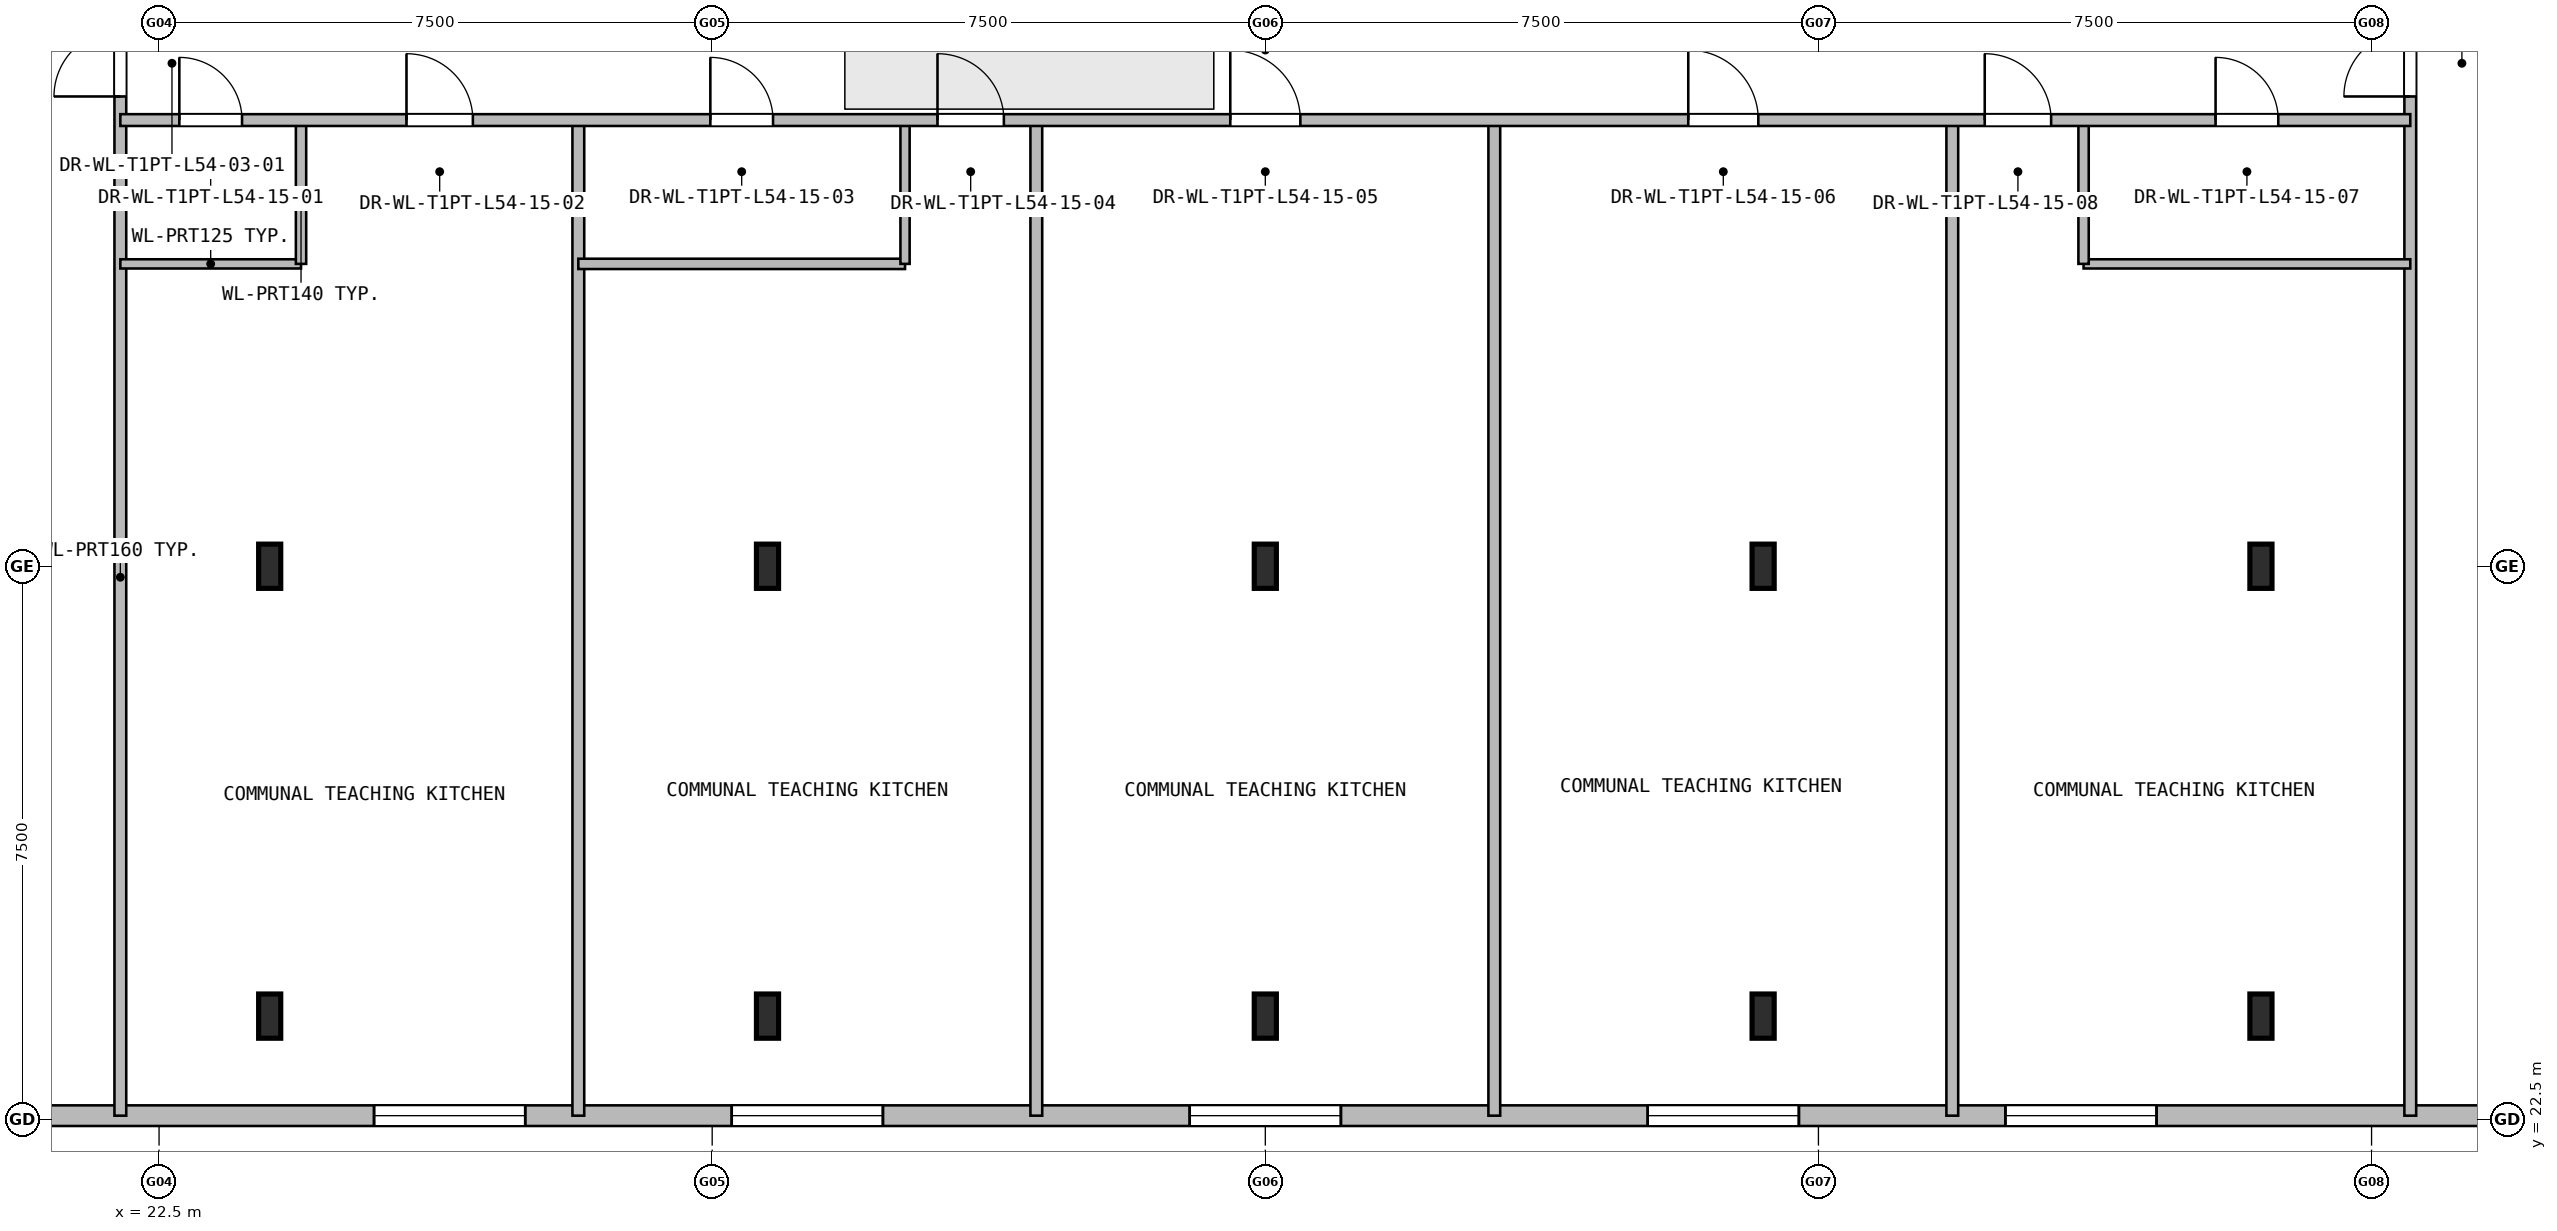
"""IFC4 building model, lengths in metres.
Left out: names, types, materials, properties, quantities, classifications, styles, units other than length and angle.
Written with IfcOpenShell. Run it as: python <this file> out.ifc"""

import sys

from ifc_helpers import new_model, si_unit, direction, frame, frame_2d, origin, origin_2d, place, context, subcontext, project, spatial, rectangle, i_section, extrude, element, fill, save


model = new_model("IFC4")
c1 = context("Model", 3, precision=1e-05, world=origin(), true_north=direction((0.0, 1.0)))
c2 = subcontext(c1, "Body", "Model", "MODEL_VIEW")
j1 = project(units=[si_unit("LENGTHUNIT", "METRE"), si_unit("PLANEANGLEUNIT", "RADIAN")], contexts=[c1])
p1 = place(None, origin())
s1 = spatial("IfcSite", under=j1, at=p1, CompositionType="ELEMENT")
p2 = place(p1, origin())
s2 = spatial("IfcBuilding", under=s1, at=p2, CompositionType="ELEMENT")
p3 = place(p2, frame((0.0, 0.0, 197.1)))
s3 = spatial("IfcBuildingStorey", under=s2, at=p3, CompositionType="ELEMENT", Elevation=197.1)
for number, where, z_axis, x_axis in (
    (1, (24.0, 23.9, 0.0), (0.0, 0.0, 1.0), (1.0, 0.0, 0.0)),
    (2, (24.0, 30.0, 0.0), (0.0, 0.0, 1.0), (1.0, 0.0, 0.0)),
    (3, (30.75, 23.9, 0.0), (0.0, 0.0, 1.0), (1.0, 0.0, 0.0)),
    (4, (30.75, 30.0, 0.0), (0.0, 0.0, 1.0), (1.0, 0.0, 0.0)),
    (5, (37.5, 23.9, 0.0), (0.0, 0.0, 1.0), (1.0, 0.0, 0.0)),
    (6, (37.5, 30.0, 0.0), (0.0, 0.0, 1.0), (1.0, 0.0, 0.0)),
    (7, (44.25, 23.9, 0.0), (0.0, 0.0, 1.0), (1.0, 0.0, 0.0)),
    (8, (44.25, 30.0, 0.0), (0.0, 0.0, 1.0), (1.0, 0.0, 0.0)),
    (9, (51.0, 23.9, 0.0), (0.0, 0.0, 1.0), (1.0, 0.0, 0.0)),
    (10, (51.0, 30.0, 0.0), (0.0, 0.0, 1.0), (1.0, 0.0, 0.0)),
):
    element("IfcColumn", number, at=place(p3, frame(where, z_axis=z_axis, x_axis=x_axis)), inside=s3, PredefinedType="COLUMN", context=c2, shape_type="SweptSolid", body=[
        extrude(i_section(OverallWidth=0.3, OverallDepth=0.6, WebThickness=0.014, FlangeThickness=0.025, at=origin_2d()), origin(), (0.0, 0.0, 1.0), 4.2),
    ])
p4 = place(p3, frame((55.375, 22.55, 0.0), z_axis=(0.0, 0.0, 1.0), x_axis=(-1.0, 0.0, 0.0)))
e11 = element("IfcWall", 11, at=p4, inside=s3, PredefinedType="SOLIDWALL", context=c2, shape_type="SweptSolid", body=[
    extrude(rectangle(XDim=35.75, YDim=0.28, at=frame_2d((17.875, 0.0))), origin(), (0.0, 0.0, 1.0), 3.88),
])
p5 = place(p4, frame((27.91, 0.0, 0.8)))
e12 = element("IfcOpeningElement", 12, at=p5, cuts=e11, PredefinedType="OPENING", context=c2, shape_type="SweptSolid", body=[
    extrude(rectangle(XDim=2.05, YDim=1.9, at=frame_2d((1.025, 0.95))), frame((0.0, 0.15, 0.0), z_axis=(0.0, -1.0, 0.0), x_axis=(1.0, 0.0, 0.0)), (0.0, 0.0, 1.0), 0.3),
])
p6 = place(p4, frame((23.06, 0.0, 0.8)))
e13 = element("IfcOpeningElement", 13, at=p6, cuts=e11, PredefinedType="OPENING", context=c2, shape_type="SweptSolid", body=[
    extrude(rectangle(XDim=2.05, YDim=1.9, at=frame_2d((1.025, 0.95))), frame((0.0, 0.15, 0.0), z_axis=(0.0, -1.0, 0.0), x_axis=(1.0, 0.0, 0.0)), (0.0, 0.0, 1.0), 0.3),
])
p7 = place(p4, frame((16.85, 0.0, 0.8)))
e14 = element("IfcOpeningElement", 14, at=p7, cuts=e11, PredefinedType="OPENING", context=c2, shape_type="SweptSolid", body=[
    extrude(rectangle(XDim=2.05, YDim=1.9, at=frame_2d((1.025, 0.95))), frame((0.0, 0.15, 0.0), z_axis=(0.0, -1.0, 0.0), x_axis=(1.0, 0.0, 0.0)), (0.0, 0.0, 1.0), 0.3),
])
p8 = place(p4, frame((10.64, 0.0, 0.8)))
e15 = element("IfcOpeningElement", 15, at=p8, cuts=e11, PredefinedType="OPENING", context=c2, shape_type="SweptSolid", body=[
    extrude(rectangle(XDim=2.05, YDim=1.9, at=frame_2d((1.025, 0.95))), frame((0.0, 0.15, 0.0), z_axis=(0.0, -1.0, 0.0), x_axis=(1.0, 0.0, 0.0)), (0.0, 0.0, 1.0), 0.3),
])
p9 = place(p4, frame((5.79, 0.0, 0.8)))
e16 = element("IfcOpeningElement", 16, at=p9, cuts=e11, PredefinedType="OPENING", context=c2, shape_type="SweptSolid", body=[
    extrude(rectangle(XDim=2.05, YDim=1.9, at=frame_2d((1.025, 0.95))), frame((0.0, 0.15, 0.0), z_axis=(0.0, -1.0, 0.0), x_axis=(1.0, 0.0, 0.0)), (0.0, 0.0, 1.0), 0.3),
])
p10 = place(p3, frame((21.975, 22.55, 0.0), z_axis=(0.0, 0.0, 1.0), x_axis=(0.0, 1.0, 0.0)))
e17 = element("IfcWall", 17, at=p10, inside=s3, PredefinedType="PARTITIONING", context=c2, shape_type="SweptSolid", body=[
    extrude(rectangle(XDim=15.65, YDim=0.16, at=frame_2d((7.825, 0.0))), origin(), (0.0, 0.0, 1.0), 3.88),
])
p11 = place(p10, frame((13.82, 0.0, 0.0)))
e18 = element("IfcOpeningElement", 18, at=p11, cuts=e17, PredefinedType="OPENING", context=c2, shape_type="SweptSolid", body=[
    extrude(rectangle(XDim=0.9, YDim=2.05, at=frame_2d((0.45, 1.025))), frame((0.0, 0.09, 0.0), z_axis=(0.0, -1.0, 0.0), x_axis=(1.0, 0.0, 0.0)), (0.0, 0.0, 1.0), 0.18),
])
p12 = place(p3, frame((53.025, 22.55, 0.0), z_axis=(0.0, 0.0, 1.0), x_axis=(0.0, 1.0, 0.0)))
e19 = element("IfcWall", 19, at=p12, inside=s3, PredefinedType="PARTITIONING", context=c2, shape_type="SweptSolid", body=[
    extrude(rectangle(XDim=15.65, YDim=0.16, at=frame_2d((7.825, 0.0))), origin(), (0.0, 0.0, 1.0), 3.88),
])
p13 = place(p12, frame((13.82, 0.0, 0.0)))
e20 = element("IfcOpeningElement", 20, at=p13, cuts=e19, PredefinedType="OPENING", context=c2, shape_type="SweptSolid", body=[
    extrude(rectangle(XDim=0.9, YDim=2.05, at=frame_2d((0.45, 1.025))), frame((0.0, 0.09, 0.0), z_axis=(0.0, -1.0, 0.0), x_axis=(1.0, 0.0, 0.0)), (0.0, 0.0, 1.0), 0.18),
])
p14 = place(p3, frame((21.975, 34.1, 0.0), z_axis=(0.0, 0.0, 1.0), x_axis=(1.0, 0.0, 0.0)))
e21 = element("IfcWall", 21, at=p14, inside=s3, PredefinedType="PARTITIONING", context=c2, shape_type="SweptSolid", body=[
    extrude(rectangle(XDim=2.45, YDim=0.125, at=frame_2d((1.225, 0.0))), origin(), (0.0, 0.0, 1.0), 3.53),
])
p15 = place(p3, frame((24.425, 34.1, 0.0), z_axis=(0.0, 0.0, 1.0), x_axis=(0.0, 1.0, 0.0)))
e22 = element("IfcWall", 22, at=p15, inside=s3, PredefinedType="PARTITIONING", context=c2, shape_type="SweptSolid", body=[
    extrude(rectangle(XDim=1.95, YDim=0.14, at=frame_2d((0.975, 0.0))), origin(), (0.0, 0.0, 1.0), 3.88),
])
p16 = place(p3, frame((28.185, 22.55, 0.0), z_axis=(0.0, 0.0, 1.0), x_axis=(0.0, 1.0, 0.0)))
e23 = element("IfcWall", 23, at=p16, inside=s3, PredefinedType="PARTITIONING", context=c2, shape_type="SweptSolid", body=[
    extrude(rectangle(XDim=13.5, YDim=0.16, at=frame_2d((6.75, 0.0))), origin(), (0.0, 0.0, 1.0), 3.88),
])
p17 = place(p3, frame((28.185, 34.1, 0.0), z_axis=(0.0, 0.0, 1.0), x_axis=(1.0, 0.0, 0.0)))
e24 = element("IfcWall", 24, at=p17, inside=s3, PredefinedType="PARTITIONING", context=c2, shape_type="SweptSolid", body=[
    extrude(rectangle(XDim=4.43, YDim=0.14, at=frame_2d((2.215, 0.0))), origin(), (0.0, 0.0, 1.0), 3.53),
])
p18 = place(p3, frame((32.615, 34.1, 0.0), z_axis=(0.0, 0.0, 1.0), x_axis=(0.0, 1.0, 0.0)))
e25 = element("IfcWall", 25, at=p18, inside=s3, PredefinedType="PARTITIONING", context=c2, shape_type="SweptSolid", body=[
    extrude(rectangle(XDim=1.95, YDim=0.125, at=frame_2d((0.975, 0.0))), origin(), (0.0, 0.0, 1.0), 3.88),
])
for number, where, z_axis, x_axis in (
    (26, (34.395, 22.55, 0.0), (0.0, 0.0, 1.0), (0.0, 1.0, 0.0)),
    (27, (40.605, 22.55, 0.0), (0.0, 0.0, 1.0), (0.0, 1.0, 0.0)),
    (28, (46.815, 22.55, 0.0), (0.0, 0.0, 1.0), (0.0, 1.0, 0.0)),
):
    element("IfcWall", number, at=place(p3, frame(where, z_axis=z_axis, x_axis=x_axis)), inside=s3, PredefinedType="PARTITIONING", context=c2, shape_type="SweptSolid", body=[
        extrude(rectangle(XDim=13.5, YDim=0.16, at=frame_2d((6.75, 0.0))), origin(), (0.0, 0.0, 1.0), 3.88),
    ])
p19 = place(p3, frame((48.595, 34.1, 0.0), z_axis=(0.0, 0.0, 1.0), x_axis=(1.0, 0.0, 0.0)))
e29 = element("IfcWall", 29, at=p19, inside=s3, PredefinedType="PARTITIONING", context=c2, shape_type="SweptSolid", body=[
    extrude(rectangle(XDim=4.43, YDim=0.125, at=frame_2d((2.215, 0.0))), origin(), (0.0, 0.0, 1.0), 3.53),
])
p20 = place(p3, frame((48.595, 34.1, 0.0), z_axis=(0.0, 0.0, 1.0), x_axis=(0.0, 1.0, 0.0)))
e30 = element("IfcWall", 30, at=p20, inside=s3, PredefinedType="PARTITIONING", context=c2, shape_type="SweptSolid", body=[
    extrude(rectangle(XDim=1.95, YDim=0.14, at=frame_2d((0.975, 0.0))), origin(), (0.0, 0.0, 1.0), 3.88),
])
p21 = place(p3, frame((21.975, 36.05, 0.0), z_axis=(0.0, 0.0, 1.0), x_axis=(1.0, 0.0, 0.0)))
e31 = element("IfcWall", 31, at=p21, inside=s3, PredefinedType="PARTITIONING", context=c2, shape_type="SweptSolid", body=[
    extrude(rectangle(XDim=31.05, YDim=0.16, at=frame_2d((15.525, 0.0))), origin(), (0.0, 0.0, 1.0), 3.88),
])
p22 = place(p21, frame((0.8, 0.0, 0.0)))
e32 = element("IfcOpeningElement", 32, at=p22, cuts=e31, PredefinedType="OPENING", context=c2, shape_type="SweptSolid", body=[
    extrude(rectangle(XDim=0.85, YDim=2.05, at=frame_2d((0.425, 1.025))), frame((0.0, 0.09, 0.0), z_axis=(0.0, -1.0, 0.0), x_axis=(1.0, 0.0, 0.0)), (0.0, 0.0, 1.0), 0.18),
])
p23 = place(p21, frame((3.88, 0.0, 0.0)))
e33 = element("IfcOpeningElement", 33, at=p23, cuts=e31, PredefinedType="OPENING", context=c2, shape_type="SweptSolid", body=[
    extrude(rectangle(XDim=0.9, YDim=2.05, at=frame_2d((0.45, 1.025))), frame((0.0, 0.09, 0.0), z_axis=(0.0, -1.0, 0.0), x_axis=(1.0, 0.0, 0.0)), (0.0, 0.0, 1.0), 0.18),
])
p24 = place(p21, frame((8.0, 0.0, 0.0)))
e34 = element("IfcOpeningElement", 34, at=p24, cuts=e31, PredefinedType="OPENING", context=c2, shape_type="SweptSolid", body=[
    extrude(rectangle(XDim=0.85, YDim=2.05, at=frame_2d((0.425, 1.025))), frame((0.0, 0.09, 0.0), z_axis=(0.0, -1.0, 0.0), x_axis=(1.0, 0.0, 0.0)), (0.0, 0.0, 1.0), 0.18),
])
p25 = place(p21, frame((11.08, 0.0, 0.0)))
e35 = element("IfcOpeningElement", 35, at=p25, cuts=e31, PredefinedType="OPENING", context=c2, shape_type="SweptSolid", body=[
    extrude(rectangle(XDim=0.9, YDim=2.05, at=frame_2d((0.45, 1.025))), frame((0.0, 0.09, 0.0), z_axis=(0.0, -1.0, 0.0), x_axis=(1.0, 0.0, 0.0)), (0.0, 0.0, 1.0), 0.18),
])
p26 = place(p21, frame((15.05, 0.0, 0.0)))
e36 = element("IfcOpeningElement", 36, at=p26, cuts=e31, PredefinedType="OPENING", context=c2, shape_type="SweptSolid", body=[
    extrude(rectangle(XDim=0.95, YDim=2.1, at=frame_2d((0.475, 1.05))), frame((0.0, 0.09, 0.0), z_axis=(0.0, -1.0, 0.0), x_axis=(1.0, 0.0, 0.0)), (0.0, 0.0, 1.0), 0.18),
])
p27 = place(p21, frame((21.26, 0.0, 0.0)))
e37 = element("IfcOpeningElement", 37, at=p27, cuts=e31, PredefinedType="OPENING", context=c2, shape_type="SweptSolid", body=[
    extrude(rectangle(XDim=0.95, YDim=2.1, at=frame_2d((0.475, 1.05))), frame((0.0, 0.09, 0.0), z_axis=(0.0, -1.0, 0.0), x_axis=(1.0, 0.0, 0.0)), (0.0, 0.0, 1.0), 0.18),
])
p28 = place(p21, frame((28.41, 0.0, 0.0)))
e38 = element("IfcOpeningElement", 38, at=p28, cuts=e31, PredefinedType="OPENING", context=c2, shape_type="SweptSolid", body=[
    extrude(rectangle(XDim=0.85, YDim=2.05, at=frame_2d((0.425, 1.025))), frame((0.0, 0.09, 0.0), z_axis=(0.0, -1.0, 0.0), x_axis=(1.0, 0.0, 0.0)), (0.0, 0.0, 1.0), 0.18),
])
p29 = place(p21, frame((25.28, 0.0, 0.0)))
e39 = element("IfcOpeningElement", 39, at=p29, cuts=e31, PredefinedType="OPENING", context=c2, shape_type="SweptSolid", body=[
    extrude(rectangle(XDim=0.9, YDim=2.05, at=frame_2d((0.45, 1.025))), frame((0.0, 0.09, 0.0), z_axis=(0.0, -1.0, 0.0), x_axis=(1.0, 0.0, 0.0)), (0.0, 0.0, 1.0), 0.18),
])
p30 = place(p5, origin())
e40 = element("IfcWindow", 40, at=p30, inside=s3, PartitioningType="SINGLE_PANEL", PredefinedType="WINDOW", context=c2, shape_type="SweptSolid", body=[
    extrude(rectangle(XDim=2.05, YDim=1.9, at=frame_2d((1.025, 0.95))), frame((0.0, 0.03, 0.0), z_axis=(0.0, -1.0, 0.0), x_axis=(1.0, 0.0, 0.0)), (0.0, 0.0, 1.0), 0.06),
])
fill(e12, e40)
p31 = place(p6, origin())
e41 = element("IfcWindow", 41, at=p31, inside=s3, PartitioningType="SINGLE_PANEL", PredefinedType="WINDOW", context=c2, shape_type="SweptSolid", body=[
    extrude(rectangle(XDim=2.05, YDim=1.9, at=frame_2d((1.025, 0.95))), frame((0.0, 0.03, 0.0), z_axis=(0.0, -1.0, 0.0), x_axis=(1.0, 0.0, 0.0)), (0.0, 0.0, 1.0), 0.06),
])
fill(e13, e41)
p32 = place(p7, origin())
e42 = element("IfcWindow", 42, at=p32, inside=s3, PartitioningType="SINGLE_PANEL", PredefinedType="WINDOW", context=c2, shape_type="SweptSolid", body=[
    extrude(rectangle(XDim=2.05, YDim=1.9, at=frame_2d((1.025, 0.95))), frame((0.0, 0.03, 0.0), z_axis=(0.0, -1.0, 0.0), x_axis=(1.0, 0.0, 0.0)), (0.0, 0.0, 1.0), 0.06),
])
fill(e14, e42)
p33 = place(p8, origin())
e43 = element("IfcWindow", 43, at=p33, inside=s3, PartitioningType="SINGLE_PANEL", PredefinedType="WINDOW", context=c2, shape_type="SweptSolid", body=[
    extrude(rectangle(XDim=2.05, YDim=1.9, at=frame_2d((1.025, 0.95))), frame((0.0, 0.03, 0.0), z_axis=(0.0, -1.0, 0.0), x_axis=(1.0, 0.0, 0.0)), (0.0, 0.0, 1.0), 0.06),
])
fill(e15, e43)
p34 = place(p9, origin())
e44 = element("IfcWindow", 44, at=p34, inside=s3, PartitioningType="SINGLE_PANEL", PredefinedType="WINDOW", context=c2, shape_type="SweptSolid", body=[
    extrude(rectangle(XDim=2.05, YDim=1.9, at=frame_2d((1.025, 0.95))), frame((0.0, 0.03, 0.0), z_axis=(0.0, -1.0, 0.0), x_axis=(1.0, 0.0, 0.0)), (0.0, 0.0, 1.0), 0.06),
])
fill(e16, e44)
p35 = place(p11, origin())
e45 = element("IfcDoor", 45, at=p35, inside=s3, OperationType="SINGLE_SWING_LEFT", PredefinedType="DOOR", context=c2, shape_type="SweptSolid", body=[
    extrude(rectangle(XDim=0.9, YDim=2.05, at=frame_2d((0.45, 1.025))), frame((0.0, 0.025, 0.0), z_axis=(0.0, -1.0, 0.0), x_axis=(1.0, 0.0, 0.0)), (0.0, 0.0, 1.0), 0.05),
])
fill(e18, e45)
p36 = place(p13, origin())
e46 = element("IfcDoor", 46, at=p36, inside=s3, OperationType="SINGLE_SWING_RIGHT", PredefinedType="DOOR", context=c2, shape_type="SweptSolid", body=[
    extrude(rectangle(XDim=0.9, YDim=2.05, at=frame_2d((0.45, 1.025))), frame((0.0, 0.025, 0.0), z_axis=(0.0, -1.0, 0.0), x_axis=(1.0, 0.0, 0.0)), (0.0, 0.0, 1.0), 0.05),
])
fill(e20, e46)
p37 = place(p22, origin())
e47 = element("IfcDoor", 47, at=p37, inside=s3, OperationType="SINGLE_SWING_LEFT", PredefinedType="DOOR", context=c2, shape_type="SweptSolid", body=[
    extrude(rectangle(XDim=0.85, YDim=2.05, at=frame_2d((0.425, 1.025))), frame((0.0, 0.025, 0.0), z_axis=(0.0, -1.0, 0.0), x_axis=(1.0, 0.0, 0.0)), (0.0, 0.0, 1.0), 0.05),
])
fill(e32, e47)
p38 = place(p23, origin())
e48 = element("IfcDoor", 48, at=p38, inside=s3, OperationType="SINGLE_SWING_RIGHT", PredefinedType="DOOR", context=c2, shape_type="SweptSolid", body=[
    extrude(rectangle(XDim=0.9, YDim=2.05, at=frame_2d((0.45, 1.025))), frame((0.0, 0.025, 0.0), z_axis=(0.0, -1.0, 0.0), x_axis=(1.0, 0.0, 0.0)), (0.0, 0.0, 1.0), 0.05),
])
fill(e33, e48)
p39 = place(p24, origin())
e49 = element("IfcDoor", 49, at=p39, inside=s3, OperationType="SINGLE_SWING_LEFT", PredefinedType="DOOR", context=c2, shape_type="SweptSolid", body=[
    extrude(rectangle(XDim=0.85, YDim=2.05, at=frame_2d((0.425, 1.025))), frame((0.0, 0.025, 0.0), z_axis=(0.0, -1.0, 0.0), x_axis=(1.0, 0.0, 0.0)), (0.0, 0.0, 1.0), 0.05),
])
fill(e34, e49)
p40 = place(p25, origin())
e50 = element("IfcDoor", 50, at=p40, inside=s3, OperationType="SINGLE_SWING_RIGHT", PredefinedType="DOOR", context=c2, shape_type="SweptSolid", body=[
    extrude(rectangle(XDim=0.9, YDim=2.05, at=frame_2d((0.45, 1.025))), frame((0.0, 0.025, 0.0), z_axis=(0.0, -1.0, 0.0), x_axis=(1.0, 0.0, 0.0)), (0.0, 0.0, 1.0), 0.05),
])
fill(e35, e50)
p41 = place(p26, origin())
e51 = element("IfcDoor", 51, at=p41, inside=s3, OperationType="SINGLE_SWING_LEFT", PredefinedType="DOOR", context=c2, shape_type="SweptSolid", body=[
    extrude(rectangle(XDim=0.95, YDim=2.1, at=frame_2d((0.475, 1.05))), frame((0.0, 0.025, 0.0), z_axis=(0.0, -1.0, 0.0), x_axis=(1.0, 0.0, 0.0)), (0.0, 0.0, 1.0), 0.05),
])
fill(e36, e51)
p42 = place(p27, origin())
e52 = element("IfcDoor", 52, at=p42, inside=s3, OperationType="SINGLE_SWING_RIGHT", PredefinedType="DOOR", context=c2, shape_type="SweptSolid", body=[
    extrude(rectangle(XDim=0.95, YDim=2.1, at=frame_2d((0.475, 1.05))), frame((0.0, 0.025, 0.0), z_axis=(0.0, -1.0, 0.0), x_axis=(1.0, 0.0, 0.0)), (0.0, 0.0, 1.0), 0.05),
])
fill(e37, e52)
p43 = place(p28, origin())
e53 = element("IfcDoor", 53, at=p43, inside=s3, OperationType="SINGLE_SWING_LEFT", PredefinedType="DOOR", context=c2, shape_type="SweptSolid", body=[
    extrude(rectangle(XDim=0.85, YDim=2.05, at=frame_2d((0.425, 1.025))), frame((0.0, 0.025, 0.0), z_axis=(0.0, -1.0, 0.0), x_axis=(1.0, 0.0, 0.0)), (0.0, 0.0, 1.0), 0.05),
])
fill(e38, e53)
p44 = place(p29, origin())
e54 = element("IfcDoor", 54, at=p44, inside=s3, OperationType="SINGLE_SWING_RIGHT", PredefinedType="DOOR", context=c2, shape_type="SweptSolid", body=[
    extrude(rectangle(XDim=0.9, YDim=2.05, at=frame_2d((0.45, 1.025))), frame((0.0, 0.025, 0.0), z_axis=(0.0, -1.0, 0.0), x_axis=(1.0, 0.0, 0.0)), (0.0, 0.0, 1.0), 0.05),
])
fill(e39, e54)
save(model, sys.argv[1])
